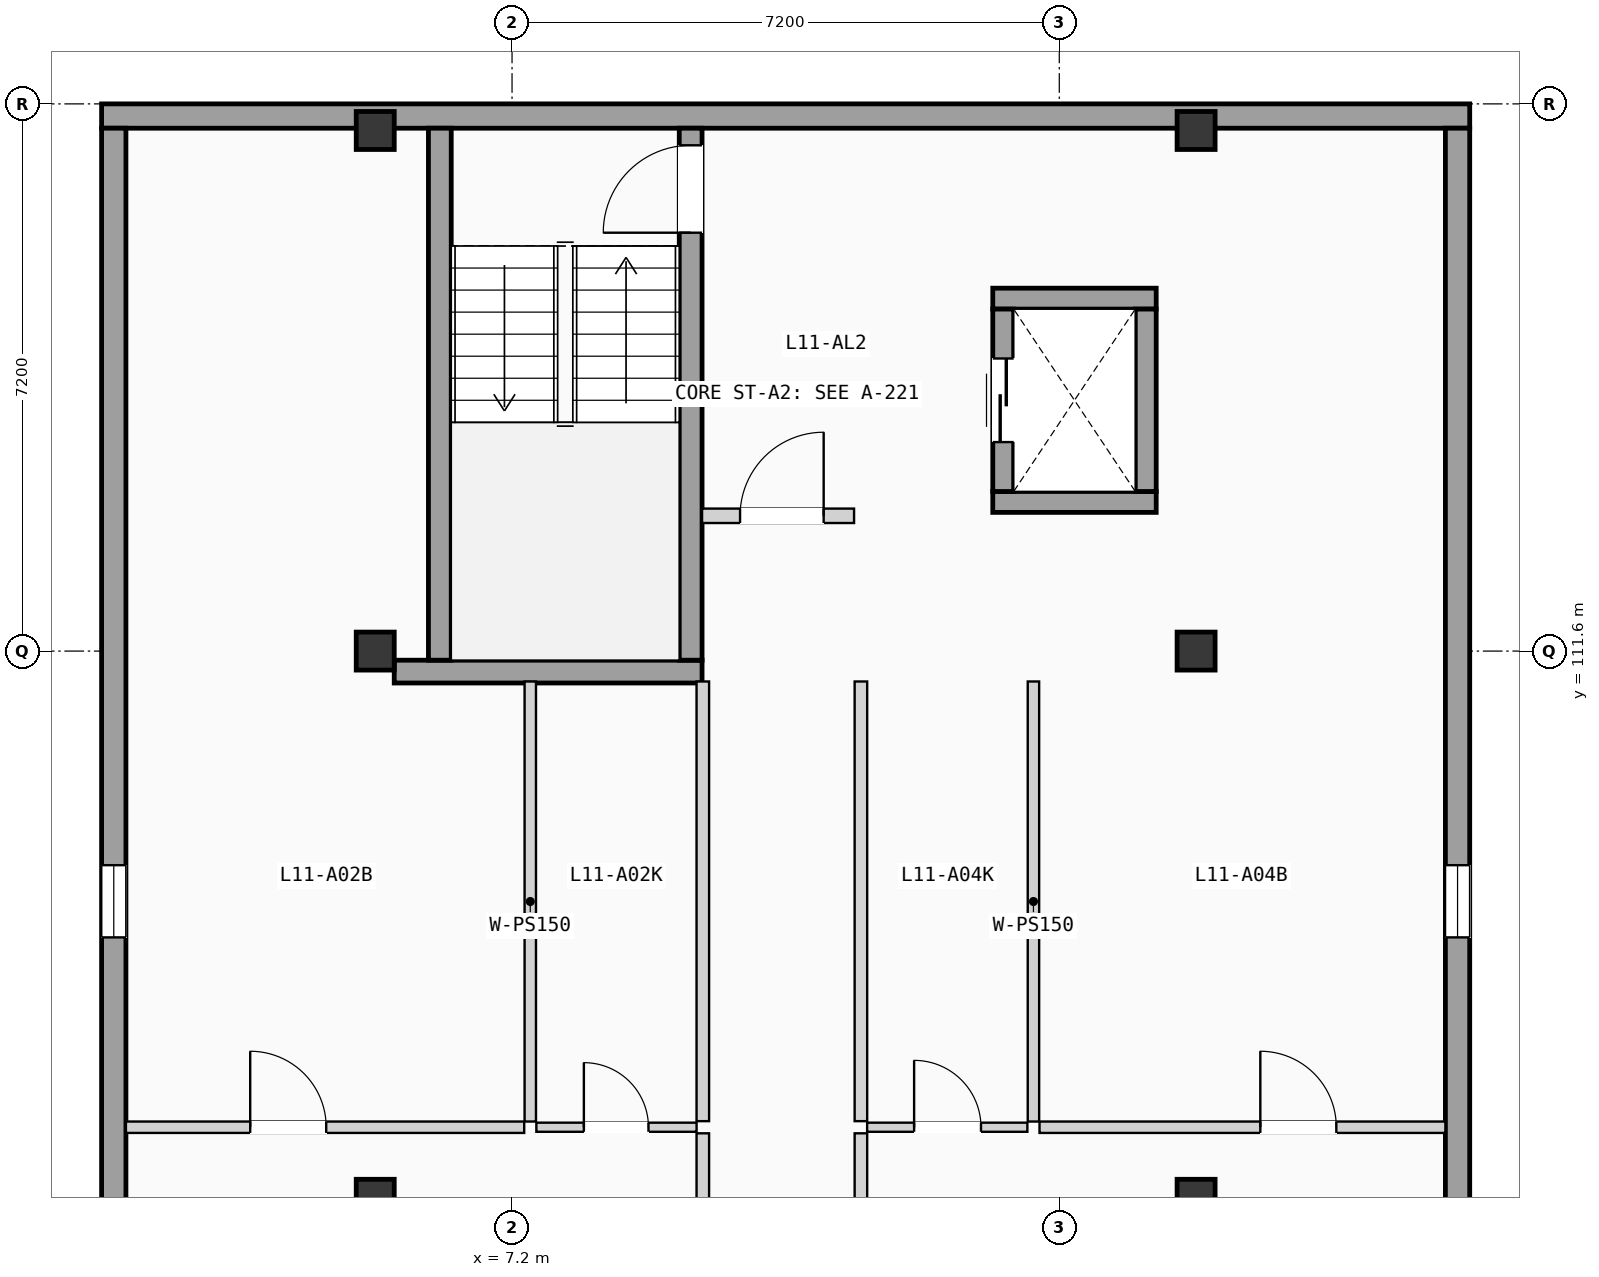
"""IFC4 building model, lengths in metres.
Left out: names, types, materials, properties, quantities, classifications, styles, units other than length and angle.
Written with IfcOpenShell. Run it as: python <this file> out.ifc"""

import sys

from ifc_helpers import new_model, si_unit, direction, frame, frame_2d, origin, origin_2d, place, context, subcontext, project, spatial, rectangle, extrude, element, fill, save


model = new_model("IFC4")
c1 = context("Model", 3, precision=1e-05, world=origin(), true_north=direction((0.0, 1.0)))
c2 = subcontext(c1, "Body", "Model", "MODEL_VIEW")
j1 = project(units=[si_unit("LENGTHUNIT", "METRE"), si_unit("PLANEANGLEUNIT", "RADIAN")], contexts=[c1])
p1 = place(None, origin())
s1 = spatial("IfcSite", under=j1, at=p1, CompositionType="ELEMENT")
p2 = place(p1, origin())
s2 = spatial("IfcBuilding", under=s1, at=p2, CompositionType="ELEMENT")
p3 = place(p2, frame((0.0, 0.0, 37.275)))
s3 = spatial("IfcBuildingStorey", under=s2, at=p3, CompositionType="ELEMENT", Elevation=37.275)
for number, where, z_axis, x_axis in (
    (1, (5.4, 104.4, 0.0), (0.0, 0.0, 1.0), (1.0, 0.0, 0.0)),
    (2, (5.4, 111.6, 0.0), (0.0, 0.0, 1.0), (1.0, 0.0, 0.0)),
    (3, (5.4, 118.45, 0.0), (0.0, 0.0, 1.0), (1.0, 0.0, 0.0)),
    (4, (16.2, 104.4, 0.0), (0.0, 0.0, 1.0), (1.0, 0.0, 0.0)),
    (5, (16.2, 111.6, 0.0), (0.0, 0.0, 1.0), (1.0, 0.0, 0.0)),
    (6, (16.2, 118.45, 0.0), (0.0, 0.0, 1.0), (1.0, 0.0, 0.0)),
):
    element("IfcColumn", number, at=place(p3, frame(where, z_axis=z_axis, x_axis=x_axis)), inside=s3, PredefinedType="COLUMN", context=c2, shape_type="SweptSolid", body=[
        extrude(rectangle(XDim=0.5, YDim=0.5, at=origin_2d()), origin(), (0.0, 0.0, 1.0), 3.15),
    ])
p4 = place(p3, frame((1.8, 118.64, 0.0), z_axis=(0.0, 0.0, 1.0), x_axis=(1.0, 0.0, 0.0)))
e7 = element("IfcWall", 7, at=p4, inside=s3, PredefinedType="SOLIDWALL", context=c2, shape_type="SweptSolid", body=[
    extrude(rectangle(XDim=18.0, YDim=0.32, at=frame_2d((9.0, 0.0))), origin(), (0.0, 0.0, 1.0), 2.9),
])
p5 = place(p3, frame((1.96, 68.72, 0.0), z_axis=(0.0, 0.0, 1.0), x_axis=(0.0, 1.0, 0.0)))
e8 = element("IfcWall", 8, at=p5, inside=s3, PredefinedType="SOLIDWALL", context=c2, shape_type="SweptSolid", body=[
    extrude(rectangle(XDim=49.76, YDim=0.32, at=frame_2d((24.88, 0.0))), origin(), (0.0, 0.0, 1.0), 2.9),
])
p6 = place(p5, frame((15.855, 0.0, 0.85)))
e9 = element("IfcOpeningElement", 9, at=p6, cuts=e8, PredefinedType="OPENING", context=c2, shape_type="SweptSolid", body=[
    extrude(rectangle(XDim=0.95, YDim=1.2, at=frame_2d((0.475, 0.6))), frame((0.0, 0.17, 0.0), z_axis=(0.0, -1.0, 0.0), x_axis=(1.0, 0.0, 0.0)), (0.0, 0.0, 1.0), 0.34),
])
p7 = place(p5, frame((8.586, 0.0, 0.9)))
e10 = element("IfcOpeningElement", 10, at=p7, cuts=e8, PredefinedType="OPENING", context=c2, shape_type="SweptSolid", body=[
    extrude(rectangle(XDim=2.3, YDim=1.2, at=frame_2d((1.15, 0.6))), frame((0.0, 0.17, 0.0), z_axis=(0.0, -1.0, 0.0), x_axis=(1.0, 0.0, 0.0)), (0.0, 0.0, 1.0), 0.34),
])
p8 = place(p5, frame((19.265, 0.0, 0.85)))
e11 = element("IfcOpeningElement", 11, at=p8, cuts=e8, PredefinedType="OPENING", context=c2, shape_type="SweptSolid", body=[
    extrude(rectangle(XDim=0.95, YDim=1.2, at=frame_2d((0.475, 0.6))), frame((0.0, 0.17, 0.0), z_axis=(0.0, -1.0, 0.0), x_axis=(1.0, 0.0, 0.0)), (0.0, 0.0, 1.0), 0.34),
])
p9 = place(p5, frame((31.309, 0.0, 0.715)))
e12 = element("IfcOpeningElement", 12, at=p9, cuts=e8, PredefinedType="OPENING", context=c2, shape_type="SweptSolid", body=[
    extrude(rectangle(XDim=2.3, YDim=1.5, at=frame_2d((1.15, 0.75))), frame((0.0, 0.17, 0.0), z_axis=(0.0, -1.0, 0.0), x_axis=(1.0, 0.0, 0.0)), (0.0, 0.0, 1.0), 0.34),
])
p10 = place(p5, frame((24.736, 0.0, 0.565)))
e13 = element("IfcOpeningElement", 13, at=p10, cuts=e8, PredefinedType="OPENING", context=c2, shape_type="SweptSolid", body=[
    extrude(rectangle(XDim=2.3, YDim=1.65, at=frame_2d((1.15, 0.825))), frame((0.0, 0.17, 0.0), z_axis=(0.0, -1.0, 0.0), x_axis=(1.0, 0.0, 0.0)), (0.0, 0.0, 1.0), 0.34),
])
p11 = place(p5, frame((39.113, 0.0, 0.85)))
e14 = element("IfcOpeningElement", 14, at=p11, cuts=e8, PredefinedType="OPENING", context=c2, shape_type="SweptSolid", body=[
    extrude(rectangle(XDim=0.95, YDim=1.2, at=frame_2d((0.475, 0.6))), frame((0.0, 0.17, 0.0), z_axis=(0.0, -1.0, 0.0), x_axis=(1.0, 0.0, 0.0)), (0.0, 0.0, 1.0), 0.34),
])
p12 = place(p3, frame((19.64, 68.72, 0.0), z_axis=(0.0, 0.0, 1.0), x_axis=(0.0, 1.0, 0.0)))
e15 = element("IfcWall", 15, at=p12, inside=s3, PredefinedType="SOLIDWALL", context=c2, shape_type="SweptSolid", body=[
    extrude(rectangle(XDim=49.76, YDim=0.32, at=frame_2d((24.88, 0.0))), origin(), (0.0, 0.0, 1.0), 2.9),
])
p13 = place(p12, frame((16.27, 0.0, 0.0)))
e16 = element("IfcOpeningElement", 16, at=p13, cuts=e15, PredefinedType="OPENING", context=c2, shape_type="SweptSolid", body=[
    extrude(rectangle(XDim=0.95, YDim=2.15, at=frame_2d((0.475, 1.075))), frame((0.0, 0.17, 0.0), z_axis=(0.0, -1.0, 0.0), x_axis=(1.0, 0.0, 0.0)), (0.0, 0.0, 1.0), 0.34),
])
p14 = place(p12, frame((9.261, 0.0, 0.9)))
e17 = element("IfcOpeningElement", 17, at=p14, cuts=e15, PredefinedType="OPENING", context=c2, shape_type="SweptSolid", body=[
    extrude(rectangle(XDim=0.95, YDim=1.2, at=frame_2d((0.475, 0.6))), frame((0.0, 0.17, 0.0), z_axis=(0.0, -1.0, 0.0), x_axis=(1.0, 0.0, 0.0)), (0.0, 0.0, 1.0), 0.34),
])
p15 = place(p12, frame((19.265, 0.0, 0.865)))
e18 = element("IfcOpeningElement", 18, at=p15, cuts=e15, PredefinedType="OPENING", context=c2, shape_type="SweptSolid", body=[
    extrude(rectangle(XDim=0.95, YDim=1.35, at=frame_2d((0.475, 0.675))), frame((0.0, 0.17, 0.0), z_axis=(0.0, -1.0, 0.0), x_axis=(1.0, 0.0, 0.0)), (0.0, 0.0, 1.0), 0.34),
])
p16 = place(p12, frame((31.984, 0.0, 0.715)))
e19 = element("IfcOpeningElement", 19, at=p16, cuts=e15, PredefinedType="OPENING", context=c2, shape_type="SweptSolid", body=[
    extrude(rectangle(XDim=0.95, YDim=1.5, at=frame_2d((0.475, 0.75))), frame((0.0, 0.17, 0.0), z_axis=(0.0, -1.0, 0.0), x_axis=(1.0, 0.0, 0.0)), (0.0, 0.0, 1.0), 0.34),
])
p17 = place(p12, frame((25.411, 0.0, 0.565)))
e20 = element("IfcOpeningElement", 20, at=p17, cuts=e15, PredefinedType="OPENING", context=c2, shape_type="SweptSolid", body=[
    extrude(rectangle(XDim=0.95, YDim=1.65, at=frame_2d((0.475, 0.825))), frame((0.0, 0.17, 0.0), z_axis=(0.0, -1.0, 0.0), x_axis=(1.0, 0.0, 0.0)), (0.0, 0.0, 1.0), 0.34),
])
p18 = place(p12, frame((39.113, 0.0, 0.85)))
e21 = element("IfcOpeningElement", 21, at=p18, cuts=e15, PredefinedType="OPENING", context=c2, shape_type="SweptSolid", body=[
    extrude(rectangle(XDim=0.95, YDim=1.2, at=frame_2d((0.475, 0.6))), frame((0.0, 0.17, 0.0), z_axis=(0.0, -1.0, 0.0), x_axis=(1.0, 0.0, 0.0)), (0.0, 0.0, 1.0), 0.34),
])
p19 = place(p3, frame((5.65, 111.33, 0.0), z_axis=(0.0, 0.0, 1.0), x_axis=(1.0, 0.0, 0.0)))
e22 = element("IfcWall", 22, at=p19, inside=s3, PredefinedType="SHEAR", context=c2, shape_type="SweptSolid", body=[
    extrude(rectangle(XDim=4.05, YDim=0.3, at=frame_2d((2.025, 0.0))), origin(), (0.0, 0.0, 1.0), 2.9),
])
p20 = place(p3, frame((6.25, 111.48, 0.0), z_axis=(0.0, 0.0, 1.0), x_axis=(0.0, 1.0, 0.0)))
e23 = element("IfcWall", 23, at=p20, inside=s3, PredefinedType="SHEAR", context=c2, shape_type="SweptSolid", body=[
    extrude(rectangle(XDim=7.0, YDim=0.3, at=frame_2d((3.5, 0.0))), origin(), (0.0, 0.0, 1.0), 2.9),
])
p21 = place(p3, frame((9.55, 111.48, 0.0), z_axis=(0.0, 0.0, 1.0), x_axis=(0.0, 1.0, 0.0)))
e24 = element("IfcWall", 24, at=p21, inside=s3, PredefinedType="SHEAR", context=c2, shape_type="SweptSolid", body=[
    extrude(rectangle(XDim=7.0, YDim=0.3, at=frame_2d((3.5, 0.0))), origin(), (0.0, 0.0, 1.0), 2.9),
])
p22 = place(p21, frame((5.625, 0.0, 0.0)))
e25 = element("IfcOpeningElement", 25, at=p22, cuts=e24, PredefinedType="OPENING", context=c2, shape_type="SweptSolid", body=[
    extrude(rectangle(XDim=1.15, YDim=2.12, at=frame_2d((0.575, 1.06))), frame((0.0, 0.16, 0.0), z_axis=(0.0, -1.0, 0.0), x_axis=(1.0, 0.0, 0.0)), (0.0, 0.0, 1.0), 0.32),
])
for number, where, z_axis, x_axis in (
    (26, (13.525, 113.562, 0.0), (0.0, 0.0, 1.0), (1.0, 0.0, 0.0)),
    (27, (13.525, 116.238, 0.0), (0.0, 0.0, 1.0), (1.0, 0.0, 0.0)),
):
    element("IfcWall", number, at=place(p3, frame(where, z_axis=z_axis, x_axis=x_axis)), inside=s3, PredefinedType="SHEAR", context=c2, shape_type="SweptSolid", body=[
        extrude(rectangle(XDim=2.15, YDim=0.275, at=frame_2d((1.075, 0.0))), origin(), (0.0, 0.0, 1.0), 2.9),
    ])
p23 = place(p3, frame((13.663, 113.7, 0.0), z_axis=(0.0, 0.0, 1.0), x_axis=(0.0, 1.0, 0.0)))
e28 = element("IfcWall", 28, at=p23, inside=s3, PredefinedType="SHEAR", context=c2, shape_type="SweptSolid", body=[
    extrude(rectangle(XDim=2.4, YDim=0.275, at=frame_2d((1.2, 0.0))), origin(), (0.0, 0.0, 1.0), 2.9),
])
p24 = place(p23, frame((0.65, 0.0, 0.0)))
e29 = element("IfcOpeningElement", 29, at=p24, cuts=e28, PredefinedType="OPENING", context=c2, shape_type="SweptSolid", body=[
    extrude(rectangle(XDim=1.1, YDim=2.15, at=frame_2d((0.55, 1.075))), frame((0.0, 0.147, 0.0), z_axis=(0.0, -1.0, 0.0), x_axis=(1.0, 0.0, 0.0)), (0.0, 0.0, 1.0), 0.295),
])
p25 = place(p3, frame((15.538, 113.7, 0.0), z_axis=(0.0, 0.0, 1.0), x_axis=(0.0, 1.0, 0.0)))
e30 = element("IfcWall", 30, at=p25, inside=s3, PredefinedType="SHEAR", context=c2, shape_type="SweptSolid", body=[
    extrude(rectangle(XDim=2.4, YDim=0.275, at=frame_2d((1.2, 0.0))), origin(), (0.0, 0.0, 1.0), 2.9),
])
p26 = place(p3, frame((9.7, 113.38, 0.0), z_axis=(0.0, 0.0, 1.0), x_axis=(1.0, 0.0, 0.0)))
e31 = element("IfcWall", 31, at=p26, inside=s3, PredefinedType="PARTITIONING", context=c2, shape_type="SweptSolid", body=[
    extrude(rectangle(XDim=2.0, YDim=0.19, at=frame_2d((1.0, 0.0))), origin(), (0.0, 0.0, 1.0), 2.87),
])
p27 = place(p26, frame((0.5, 0.0, 0.0)))
e32 = element("IfcOpeningElement", 32, at=p27, cuts=e31, PredefinedType="OPENING", context=c2, shape_type="SweptSolid", body=[
    extrude(rectangle(XDim=1.1, YDim=2.12, at=frame_2d((0.55, 1.06))), frame((0.0, 0.105, 0.0), z_axis=(0.0, -1.0, 0.0), x_axis=(1.0, 0.0, 0.0)), (0.0, 0.0, 1.0), 0.21),
])
p28 = place(p3, frame((9.71, 98.227, 0.0), z_axis=(0.0, 0.0, 1.0), x_axis=(0.0, 1.0, 0.0)))
e33 = element("IfcWall", 33, at=p28, inside=s3, PredefinedType="PARTITIONING", context=c2, shape_type="SweptSolid", body=[
    extrude(rectangle(XDim=7.028, YDim=0.165, at=frame_2d((3.514, 0.0))), origin(), (0.0, 0.0, 1.0), 2.87),
])
p29 = place(p28, frame((3.024, 0.0, 0.0)))
e34 = element("IfcOpeningElement", 34, at=p29, cuts=e33, PredefinedType="OPENING", context=c2, shape_type="SweptSolid", body=[
    extrude(rectangle(XDim=0.98, YDim=2.08, at=frame_2d((0.49, 1.04))), frame((0.0, 0.093, 0.0), z_axis=(0.0, -1.0, 0.0), x_axis=(1.0, 0.0, 0.0)), (0.0, 0.0, 1.0), 0.185),
])
p30 = place(p3, frame((9.71, 105.415, 0.0), z_axis=(0.0, 0.0, 1.0), x_axis=(0.0, 1.0, 0.0)))
e35 = element("IfcWall", 35, at=p30, inside=s3, PredefinedType="PARTITIONING", context=c2, shape_type="SweptSolid", body=[
    extrude(rectangle(XDim=5.785, YDim=0.165, at=frame_2d((2.893, 0.0))), origin(), (0.0, 0.0, 1.0), 2.87),
])
p31 = place(p3, frame((11.79, 98.227, 0.0), z_axis=(0.0, 0.0, 1.0), x_axis=(0.0, 1.0, 0.0)))
e36 = element("IfcWall", 36, at=p31, inside=s3, PredefinedType="PARTITIONING", context=c2, shape_type="SweptSolid", body=[
    extrude(rectangle(XDim=7.028, YDim=0.165, at=frame_2d((3.514, 0.0))), origin(), (0.0, 0.0, 1.0), 2.87),
])
p32 = place(p31, frame((3.024, 0.0, 0.0)))
e37 = element("IfcOpeningElement", 37, at=p32, cuts=e36, PredefinedType="OPENING", context=c2, shape_type="SweptSolid", body=[
    extrude(rectangle(XDim=0.98, YDim=2.08, at=frame_2d((0.49, 1.04))), frame((0.0, 0.093, 0.0), z_axis=(0.0, -1.0, 0.0), x_axis=(1.0, 0.0, 0.0)), (0.0, 0.0, 1.0), 0.185),
])
p33 = place(p3, frame((11.79, 105.415, 0.0), z_axis=(0.0, 0.0, 1.0), x_axis=(0.0, 1.0, 0.0)))
e38 = element("IfcWall", 38, at=p33, inside=s3, PredefinedType="PARTITIONING", context=c2, shape_type="SweptSolid", body=[
    extrude(rectangle(XDim=5.785, YDim=0.165, at=frame_2d((2.893, 0.0))), origin(), (0.0, 0.0, 1.0), 2.87),
])
p34 = place(p3, frame((7.52, 105.335, 0.0), z_axis=(0.0, 0.0, 1.0), x_axis=(1.0, 0.0, 0.0)))
e39 = element("IfcWall", 39, at=p34, inside=s3, PredefinedType="PARTITIONING", context=c2, shape_type="SweptSolid", body=[
    extrude(rectangle(XDim=2.108, YDim=0.12, at=frame_2d((1.054, 0.0))), origin(), (0.0, 0.0, 1.0), 2.87),
])
p35 = place(p34, frame((0.625, 0.0, 0.0)))
e40 = element("IfcOpeningElement", 40, at=p35, cuts=e39, PredefinedType="OPENING", context=c2, shape_type="SweptSolid", body=[
    extrude(rectangle(XDim=0.85, YDim=2.01, at=frame_2d((0.425, 1.005))), frame((0.0, 0.07, 0.0), z_axis=(0.0, -1.0, 0.0), x_axis=(1.0, 0.0, 0.0)), (0.0, 0.0, 1.0), 0.14),
])
p36 = place(p3, frame((2.12, 105.335, 0.0), z_axis=(0.0, 0.0, 1.0), x_axis=(1.0, 0.0, 0.0)))
e41 = element("IfcWall", 41, at=p36, inside=s3, PredefinedType="PARTITIONING", context=c2, shape_type="SweptSolid", body=[
    extrude(rectangle(XDim=5.24, YDim=0.15, at=frame_2d((2.62, 0.0))), origin(), (0.0, 0.0, 1.0), 2.87),
])
p37 = place(p36, frame((1.635, 0.0, 0.0)))
e42 = element("IfcOpeningElement", 42, at=p37, cuts=e41, PredefinedType="OPENING", context=c2, shape_type="SweptSolid", body=[
    extrude(rectangle(XDim=1.0, YDim=2.06, at=frame_2d((0.5, 1.03))), frame((0.0, 0.085, 0.0), z_axis=(0.0, -1.0, 0.0), x_axis=(1.0, 0.0, 0.0)), (0.0, 0.0, 1.0), 0.17),
])
p38 = place(p3, frame((7.44, 105.41, 0.0), z_axis=(0.0, 0.0, 1.0), x_axis=(0.0, 1.0, 0.0)))
e43 = element("IfcWall", 43, at=p38, inside=s3, PredefinedType="PARTITIONING", context=c2, shape_type="SweptSolid", body=[
    extrude(rectangle(XDim=5.79, YDim=0.15, at=frame_2d((2.895, 0.0))), origin(), (0.0, 0.0, 1.0), 2.87),
])
p39 = place(p3, frame((11.872, 105.335, 0.0), z_axis=(0.0, 0.0, 1.0), x_axis=(1.0, 0.0, 0.0)))
e44 = element("IfcWall", 44, at=p39, inside=s3, PredefinedType="PARTITIONING", context=c2, shape_type="SweptSolid", body=[
    extrude(rectangle(XDim=2.108, YDim=0.12, at=frame_2d((1.054, 0.0))), origin(), (0.0, 0.0, 1.0), 2.87),
])
p40 = place(p39, frame((0.618, 0.0, 0.0)))
e45 = element("IfcOpeningElement", 45, at=p40, cuts=e44, PredefinedType="OPENING", context=c2, shape_type="SweptSolid", body=[
    extrude(rectangle(XDim=0.88, YDim=2.02, at=frame_2d((0.44, 1.01))), frame((0.0, 0.07, 0.0), z_axis=(0.0, -1.0, 0.0), x_axis=(1.0, 0.0, 0.0)), (0.0, 0.0, 1.0), 0.14),
])
p41 = place(p3, frame((14.14, 105.335, 0.0), z_axis=(0.0, 0.0, 1.0), x_axis=(1.0, 0.0, 0.0)))
e46 = element("IfcWall", 46, at=p41, inside=s3, PredefinedType="PARTITIONING", context=c2, shape_type="SweptSolid", body=[
    extrude(rectangle(XDim=5.34, YDim=0.15, at=frame_2d((2.67, 0.0))), origin(), (0.0, 0.0, 1.0), 2.87),
])
p42 = place(p41, frame((2.905, 0.0, 0.0)))
e47 = element("IfcOpeningElement", 47, at=p42, cuts=e46, PredefinedType="OPENING", context=c2, shape_type="SweptSolid", body=[
    extrude(rectangle(XDim=1.0, YDim=2.06, at=frame_2d((0.5, 1.03))), frame((0.0, 0.085, 0.0), z_axis=(0.0, -1.0, 0.0), x_axis=(1.0, 0.0, 0.0)), (0.0, 0.0, 1.0), 0.17),
])
p43 = place(p3, frame((14.06, 105.41, 0.0), z_axis=(0.0, 0.0, 1.0), x_axis=(0.0, 1.0, 0.0)))
e48 = element("IfcWall", 48, at=p43, inside=s3, PredefinedType="PARTITIONING", context=c2, shape_type="SweptSolid", body=[
    extrude(rectangle(XDim=5.79, YDim=0.15, at=frame_2d((2.895, 0.0))), origin(), (0.0, 0.0, 1.0), 2.87),
])
p44 = place(p11, origin())
e49 = element("IfcWindow", 49, at=p44, inside=s3, PartitioningType="SINGLE_PANEL", PredefinedType="WINDOW", context=c2, shape_type="SweptSolid", body=[
    extrude(rectangle(XDim=0.95, YDim=1.2, at=frame_2d((0.475, 0.6))), frame((0.0, 0.03, 0.0), z_axis=(0.0, -1.0, 0.0), x_axis=(1.0, 0.0, 0.0)), (0.0, 0.0, 1.0), 0.06),
])
fill(e14, e49)
p45 = place(p18, origin())
e50 = element("IfcWindow", 50, at=p45, inside=s3, PartitioningType="SINGLE_PANEL", PredefinedType="WINDOW", context=c2, shape_type="SweptSolid", body=[
    extrude(rectangle(XDim=0.95, YDim=1.2, at=frame_2d((0.475, 0.6))), frame((0.0, 0.03, 0.0), z_axis=(0.0, -1.0, 0.0), x_axis=(1.0, 0.0, 0.0)), (0.0, 0.0, 1.0), 0.06),
])
fill(e21, e50)
p46 = place(p22, origin())
e51 = element("IfcDoor", 51, at=p46, inside=s3, OperationType="SINGLE_SWING_LEFT", PredefinedType="DOOR", context=c2, shape_type="SweptSolid", body=[
    extrude(rectangle(XDim=1.15, YDim=2.12, at=frame_2d((0.575, 1.06))), frame((0.0, 0.025, 0.0), z_axis=(0.0, -1.0, 0.0), x_axis=(1.0, 0.0, 0.0)), (0.0, 0.0, 1.0), 0.05),
])
fill(e25, e51)
p47 = place(p24, origin())
e52 = element("IfcDoor", 52, at=p47, inside=s3, OperationType="SLIDING_TO_LEFT", PredefinedType="DOOR", context=c2, shape_type="SweptSolid", body=[
    extrude(rectangle(XDim=1.1, YDim=2.15, at=frame_2d((0.55, 1.075))), frame((0.0, 0.025, 0.0), z_axis=(0.0, -1.0, 0.0), x_axis=(1.0, 0.0, 0.0)), (0.0, 0.0, 1.0), 0.05),
])
fill(e29, e52)
p48 = place(p27, origin())
e53 = element("IfcDoor", 53, at=p48, inside=s3, OperationType="SINGLE_SWING_RIGHT", PredefinedType="DOOR", context=c2, shape_type="SweptSolid", body=[
    extrude(rectangle(XDim=1.1, YDim=2.12, at=frame_2d((0.55, 1.06))), frame((0.0, 0.025, 0.0), z_axis=(0.0, -1.0, 0.0), x_axis=(1.0, 0.0, 0.0)), (0.0, 0.0, 1.0), 0.05),
])
fill(e32, e53)
p49 = place(p35, origin())
e54 = element("IfcDoor", 54, at=p49, inside=s3, OperationType="SINGLE_SWING_LEFT", PredefinedType="DOOR", context=c2, shape_type="SweptSolid", body=[
    extrude(rectangle(XDim=0.85, YDim=2.01, at=frame_2d((0.425, 1.005))), frame((0.0, 0.025, 0.0), z_axis=(0.0, -1.0, 0.0), x_axis=(1.0, 0.0, 0.0)), (0.0, 0.0, 1.0), 0.05),
])
fill(e40, e54)
p50 = place(p37, origin())
e55 = element("IfcDoor", 55, at=p50, inside=s3, OperationType="SINGLE_SWING_LEFT", PredefinedType="DOOR", context=c2, shape_type="SweptSolid", body=[
    extrude(rectangle(XDim=1.0, YDim=2.06, at=frame_2d((0.5, 1.03))), frame((0.0, 0.025, 0.0), z_axis=(0.0, -1.0, 0.0), x_axis=(1.0, 0.0, 0.0)), (0.0, 0.0, 1.0), 0.05),
])
fill(e42, e55)
p51 = place(p40, origin())
e56 = element("IfcDoor", 56, at=p51, inside=s3, OperationType="SINGLE_SWING_LEFT", PredefinedType="DOOR", context=c2, shape_type="SweptSolid", body=[
    extrude(rectangle(XDim=0.88, YDim=2.02, at=frame_2d((0.44, 1.01))), frame((0.0, 0.025, 0.0), z_axis=(0.0, -1.0, 0.0), x_axis=(1.0, 0.0, 0.0)), (0.0, 0.0, 1.0), 0.05),
])
fill(e45, e56)
p52 = place(p42, origin())
e57 = element("IfcDoor", 57, at=p52, inside=s3, OperationType="SINGLE_SWING_LEFT", PredefinedType="DOOR", context=c2, shape_type="SweptSolid", body=[
    extrude(rectangle(XDim=1.0, YDim=2.06, at=frame_2d((0.5, 1.03))), frame((0.0, 0.025, 0.0), z_axis=(0.0, -1.0, 0.0), x_axis=(1.0, 0.0, 0.0)), (0.0, 0.0, 1.0), 0.05),
])
fill(e47, e57)
save(model, sys.argv[1])
